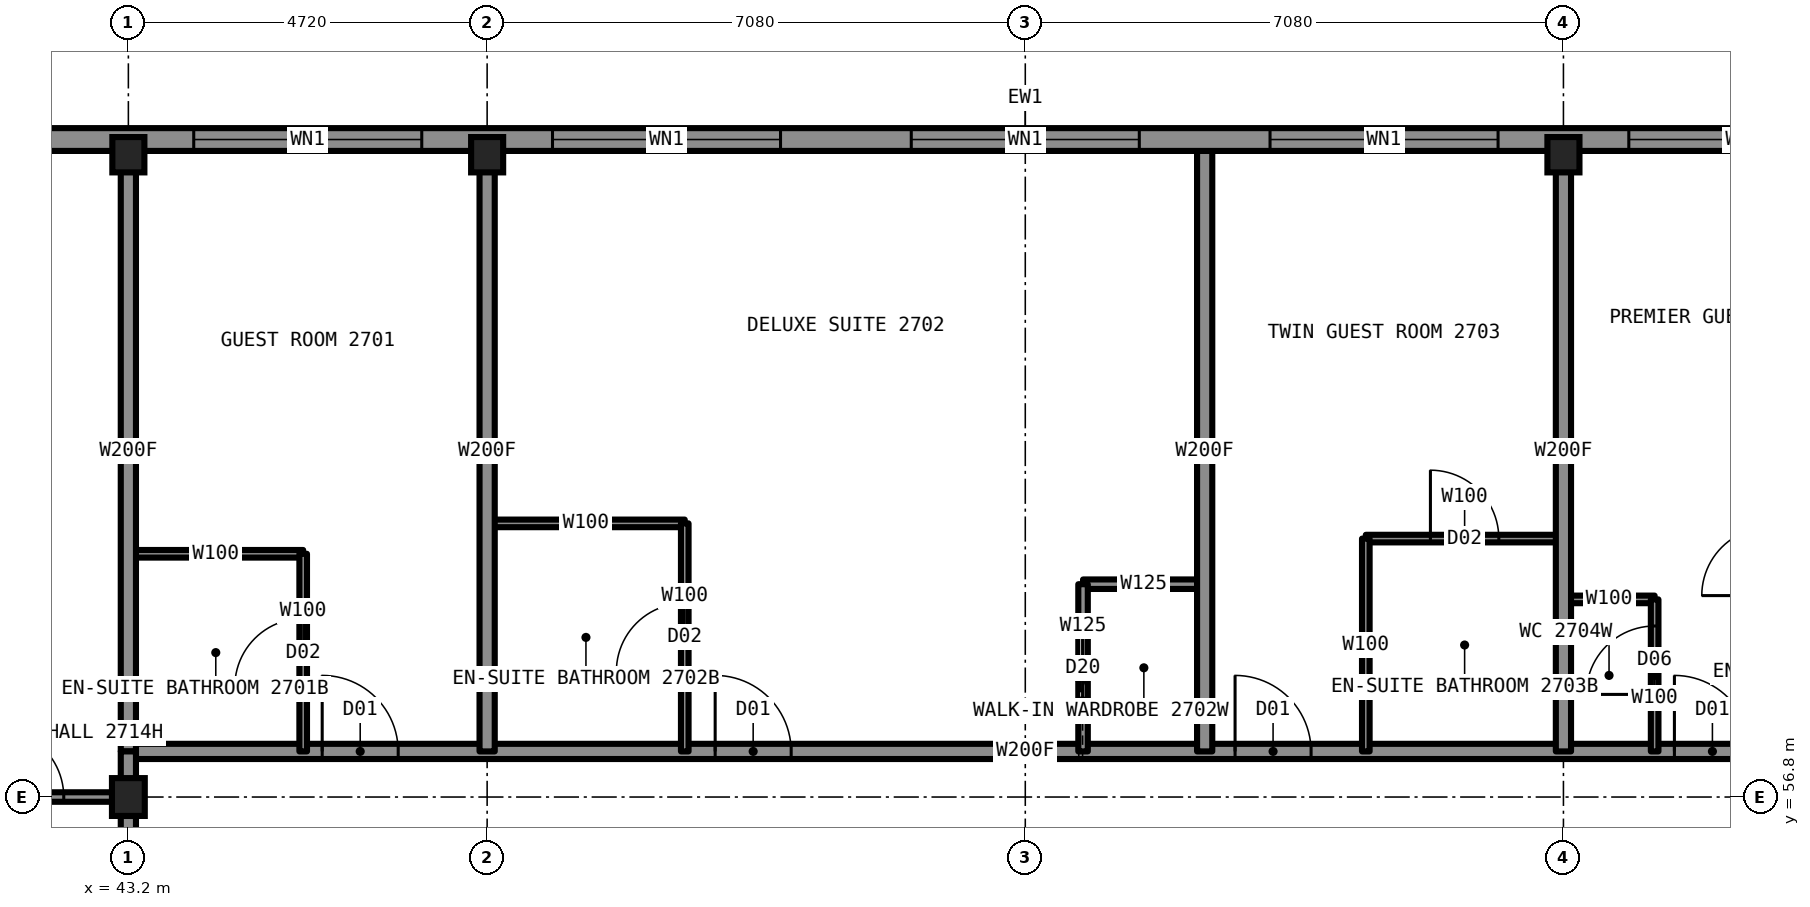
"""IFC4 building model, lengths in metres.
Left out: names, types, materials, properties, quantities, classifications, styles, units other than length and angle.
Written with IfcOpenShell. Run it as: python <this file> out.ifc"""

import sys

from ifc_helpers import new_model, si_unit, direction, frame, frame_2d, origin, origin_2d, place, context, subcontext, project, spatial, rectangle, i_section, extrude, element, fill, save


model = new_model("IFC4")
c1 = context("Model", 3, precision=1e-05, world=origin(), true_north=direction((0.0, 1.0)))
c2 = subcontext(c1, "Body", "Model", "MODEL_VIEW")
j1 = project(units=[si_unit("LENGTHUNIT", "METRE"), si_unit("PLANEANGLEUNIT", "RADIAN")], contexts=[c1])
p1 = place(None, origin())
s1 = spatial("IfcSite", under=j1, at=p1, CompositionType="ELEMENT")
p2 = place(p1, origin())
s2 = spatial("IfcBuilding", under=s1, at=p2, CompositionType="ELEMENT")
p3 = place(p2, frame((0.0, 0.0, 103.9)))
s3 = spatial("IfcBuildingStorey", under=s2, at=p3, CompositionType="ELEMENT", Elevation=103.9)
for number, where, z_axis, x_axis in (
    (1, (43.2, 65.25, 0.0), (0.0, 0.0, 1.0), (1.0, 0.0, 0.0)),
    (2, (47.92, 65.25, 0.0), (0.0, 0.0, 1.0), (1.0, 0.0, 0.0)),
    (3, (62.08, 65.25, 0.0), (0.0, 0.0, 1.0), (1.0, 0.0, 0.0)),
):
    element("IfcColumn", number, at=place(p3, frame(where, z_axis=z_axis, x_axis=x_axis)), inside=s3, PredefinedType="COLUMN", context=c2, shape_type="SweptSolid", body=[
        extrude(i_section(OverallWidth=0.422, OverallDepth=0.465, WebThickness=0.045, FlangeThickness=0.073, at=origin_2d()), origin(), (0.0, 0.0, 1.0), 3.5),
    ])
p4 = place(p3, frame((43.2, 56.8, 0.0), z_axis=(0.0, 0.0, 1.0), x_axis=(1.0, 0.0, 0.0)))
e4 = element("IfcColumn", 4, at=p4, inside=s3, PredefinedType="COLUMN", context=c2, shape_type="SweptSolid", body=[
    extrude(i_section(OverallWidth=0.432, OverallDepth=0.498, WebThickness=0.056, FlangeThickness=0.089, at=origin_2d()), origin(), (0.0, 0.0, 1.0), 3.5),
])
p5 = place(p3, frame((34.7, 56.8, 0.0), z_axis=(0.0, 0.0, 1.0), x_axis=(1.0, 0.0, 0.0)))
e5 = element("IfcWall", 5, at=p5, inside=s3, PredefinedType="PARTITIONING", context=c2, shape_type="SweptSolid", body=[
    extrude(rectangle(XDim=8.5, YDim=0.125, at=frame_2d((4.25, 0.0))), origin(), (0.0, 0.0, 1.0), 2.573),
])
p6 = place(p5, frame((6.75, 0.0, 0.0)))
e6 = element("IfcOpeningElement", 6, at=p6, cuts=e5, PredefinedType="OPENING", context=c2, shape_type="SweptSolid", body=[
    extrude(rectangle(XDim=0.9, YDim=2.2, at=frame_2d((0.45, 1.1))), frame((0.0, 0.073, 0.0), z_axis=(0.0, -1.0, 0.0), x_axis=(1.0, 0.0, 0.0)), (0.0, 0.0, 1.0), 0.145),
])
p7 = place(p3, frame((43.2, 57.4, 0.0), z_axis=(0.0, 0.0, 1.0), x_axis=(1.0, 0.0, 0.0)))
e7 = element("IfcWall", 7, at=p7, inside=s3, PredefinedType="PARTITIONING", context=c2, shape_type="SweptSolid", body=[
    extrude(rectangle(XDim=23.6, YDim=0.2, at=frame_2d((11.8, 0.0))), origin(), (0.0, 0.0, 1.0), 3.33),
])
p8 = place(p7, frame((2.55, 0.0, 0.0)))
e8 = element("IfcOpeningElement", 8, at=p8, cuts=e7, PredefinedType="OPENING", context=c2, shape_type="SweptSolid", body=[
    extrude(rectangle(XDim=1.0, YDim=2.2, at=frame_2d((0.5, 1.1))), frame((0.0, 0.11, 0.0), z_axis=(0.0, -1.0, 0.0), x_axis=(1.0, 0.0, 0.0)), (0.0, 0.0, 1.0), 0.22),
])
p9 = place(p7, frame((7.72, 0.0, 0.0)))
e9 = element("IfcOpeningElement", 9, at=p9, cuts=e7, PredefinedType="OPENING", context=c2, shape_type="SweptSolid", body=[
    extrude(rectangle(XDim=1.0, YDim=2.2, at=frame_2d((0.5, 1.1))), frame((0.0, 0.11, 0.0), z_axis=(0.0, -1.0, 0.0), x_axis=(1.0, 0.0, 0.0)), (0.0, 0.0, 1.0), 0.22),
])
p10 = place(p7, frame((14.56, 0.0, 0.0)))
e10 = element("IfcOpeningElement", 10, at=p10, cuts=e7, PredefinedType="OPENING", context=c2, shape_type="SweptSolid", body=[
    extrude(rectangle(XDim=1.0, YDim=2.2, at=frame_2d((0.5, 1.1))), frame((0.0, 0.11, 0.0), z_axis=(0.0, -1.0, 0.0), x_axis=(1.0, 0.0, 0.0)), (0.0, 0.0, 1.0), 0.22),
])
p11 = place(p7, frame((20.34, 0.0, 0.0)))
e11 = element("IfcOpeningElement", 11, at=p11, cuts=e7, PredefinedType="OPENING", context=c2, shape_type="SweptSolid", body=[
    extrude(rectangle(XDim=1.0, YDim=2.2, at=frame_2d((0.5, 1.1))), frame((0.0, 0.11, 0.0), z_axis=(0.0, -1.0, 0.0), x_axis=(1.0, 0.0, 0.0)), (0.0, 0.0, 1.0), 0.22),
])
p12 = place(p3, frame((62.08, 59.4, 0.0), z_axis=(0.0, 0.0, 1.0), x_axis=(1.0, 0.0, 0.0)))
e12 = element("IfcWall", 12, at=p12, inside=s3, PredefinedType="PARTITIONING", context=c2, shape_type="SweptSolid", body=[
    extrude(rectangle(XDim=1.2, YDim=0.1, at=frame_2d((0.6, 0.0))), origin(), (0.0, 0.0, 1.0), 3.33),
])
p13 = place(p3, frame((55.76, 59.6, 0.0), z_axis=(0.0, 0.0, 1.0), x_axis=(1.0, 0.0, 0.0)))
e13 = element("IfcWall", 13, at=p13, inside=s3, PredefinedType="PARTITIONING", context=c2, shape_type="SweptSolid", body=[
    extrude(rectangle(XDim=1.6, YDim=0.125, at=frame_2d((0.8, 0.0))), origin(), (0.0, 0.0, 1.0), 3.33),
])
p14 = place(p3, frame((43.2, 60.0, 0.0), z_axis=(0.0, 0.0, 1.0), x_axis=(1.0, 0.0, 0.0)))
e14 = element("IfcWall", 14, at=p14, inside=s3, PredefinedType="PARTITIONING", context=c2, shape_type="SweptSolid", body=[
    extrude(rectangle(XDim=2.3, YDim=0.1, at=frame_2d((1.15, 0.0))), origin(), (0.0, 0.0, 1.0), 2.731),
])
p15 = place(p3, frame((59.48, 60.2, 0.0), z_axis=(0.0, 0.0, 1.0), x_axis=(1.0, 0.0, 0.0)))
e15 = element("IfcWall", 15, at=p15, inside=s3, PredefinedType="PARTITIONING", context=c2, shape_type="SweptSolid", body=[
    extrude(rectangle(XDim=2.6, YDim=0.1, at=frame_2d((1.3, 0.0))), origin(), (0.0, 0.0, 1.0), 2.731),
])
p16 = place(p15, frame((0.85, 0.0, 0.0)))
e16 = element("IfcOpeningElement", 16, at=p16, cuts=e15, PredefinedType="OPENING", context=c2, shape_type="SweptSolid", body=[
    extrude(rectangle(XDim=0.9, YDim=2.1, at=frame_2d((0.45, 1.05))), frame((0.0, 0.06, 0.0), z_axis=(0.0, -1.0, 0.0), x_axis=(1.0, 0.0, 0.0)), (0.0, 0.0, 1.0), 0.12),
])
p17 = place(p3, frame((47.92, 60.4, 0.0), z_axis=(0.0, 0.0, 1.0), x_axis=(1.0, 0.0, 0.0)))
e17 = element("IfcWall", 17, at=p17, inside=s3, PredefinedType="PARTITIONING", context=c2, shape_type="SweptSolid", body=[
    extrude(rectangle(XDim=2.6, YDim=0.1, at=frame_2d((1.3, 0.0))), origin(), (0.0, 0.0, 1.0), 3.33),
])
p18 = place(p3, frame((43.2, 33.2, 0.0), z_axis=(0.0, 0.0, 1.0), x_axis=(0.0, 1.0, 0.0)))
e18 = element("IfcWall", 18, at=p18, inside=s3, PredefinedType="PARTITIONING", context=c2, shape_type="SweptSolid", body=[
    extrude(rectangle(XDim=23.58, YDim=0.2, at=frame_2d((11.79, 0.0))), origin(), (0.0, 0.0, 1.0), 3.33),
])
p19 = place(p18, frame((7.72, 0.0, 0.0)))
e19 = element("IfcOpeningElement", 19, at=p19, cuts=e18, PredefinedType="OPENING", context=c2, shape_type="SweptSolid", body=[
    extrude(rectangle(XDim=1.0, YDim=2.2, at=frame_2d((0.5, 1.1))), frame((0.0, 0.11, 0.0), z_axis=(0.0, -1.0, 0.0), x_axis=(1.0, 0.0, 0.0)), (0.0, 0.0, 1.0), 0.22),
])
p20 = place(p18, frame((14.56, 0.0, 0.0)))
e20 = element("IfcOpeningElement", 20, at=p20, cuts=e18, PredefinedType="OPENING", context=c2, shape_type="SweptSolid", body=[
    extrude(rectangle(XDim=1.0, YDim=2.2, at=frame_2d((0.5, 1.1))), frame((0.0, 0.11, 0.0), z_axis=(0.0, -1.0, 0.0), x_axis=(1.0, 0.0, 0.0)), (0.0, 0.0, 1.0), 0.22),
])
p21 = place(p18, frame((21.84, 0.0, 0.0)))
e21 = element("IfcOpeningElement", 21, at=p21, cuts=e18, PredefinedType="OPENING", context=c2, shape_type="SweptSolid", body=[
    extrude(rectangle(XDim=1.1, YDim=2.2, at=frame_2d((0.55, 1.1))), frame((0.0, 0.11, 0.0), z_axis=(0.0, -1.0, 0.0), x_axis=(1.0, 0.0, 0.0)), (0.0, 0.0, 1.0), 0.22),
])
p22 = place(p18, frame((0.66, 0.0, 0.0)))
e22 = element("IfcOpeningElement", 22, at=p22, cuts=e18, PredefinedType="OPENING", context=c2, shape_type="SweptSolid", body=[
    extrude(rectangle(XDim=1.1, YDim=2.2, at=frame_2d((0.55, 1.1))), frame((0.0, 0.11, 0.0), z_axis=(0.0, -1.0, 0.0), x_axis=(1.0, 0.0, 0.0)), (0.0, 0.0, 1.0), 0.22),
])
p23 = place(p3, frame((43.2, 57.4, 0.0), z_axis=(0.0, 0.0, 1.0), x_axis=(0.0, 1.0, 0.0)))
e23 = element("IfcWall", 23, at=p23, inside=s3, PredefinedType="PARTITIONING", context=c2, shape_type="SweptSolid", body=[
    extrude(rectangle(XDim=7.9, YDim=0.2, at=frame_2d((3.95, 0.0))), origin(), (0.0, 0.0, 1.0), 2.573),
])
p24 = place(p3, frame((50.52, 57.4, 0.0), z_axis=(0.0, 0.0, 1.0), x_axis=(0.0, 1.0, 0.0)))
e24 = element("IfcWall", 24, at=p24, inside=s3, PredefinedType="PARTITIONING", context=c2, shape_type="SweptSolid", body=[
    extrude(rectangle(XDim=3.0, YDim=0.1, at=frame_2d((1.5, 0.0))), origin(), (0.0, 0.0, 1.0), 3.33),
])
p25 = place(p24, frame((1.05, 0.0, 0.0)))
e25 = element("IfcOpeningElement", 25, at=p25, cuts=e24, PredefinedType="OPENING", context=c2, shape_type="SweptSolid", body=[
    extrude(rectangle(XDim=0.9, YDim=2.1, at=frame_2d((0.45, 1.05))), frame((0.0, 0.06, 0.0), z_axis=(0.0, -1.0, 0.0), x_axis=(1.0, 0.0, 0.0)), (0.0, 0.0, 1.0), 0.12),
])
p26 = place(p3, frame((47.92, 57.4, 0.0), z_axis=(0.0, 0.0, 1.0), x_axis=(0.0, 1.0, 0.0)))
e26 = element("IfcWall", 26, at=p26, inside=s3, PredefinedType="PARTITIONING", context=c2, shape_type="SweptSolid", body=[
    extrude(rectangle(XDim=7.9, YDim=0.2, at=frame_2d((3.95, 0.0))), origin(), (0.0, 0.0, 1.0), 2.573),
])
p27 = place(p3, frame((45.5, 57.4, 0.0), z_axis=(0.0, 0.0, 1.0), x_axis=(0.0, 1.0, 0.0)))
e27 = element("IfcWall", 27, at=p27, inside=s3, PredefinedType="PARTITIONING", context=c2, shape_type="SweptSolid", body=[
    extrude(rectangle(XDim=2.6, YDim=0.1, at=frame_2d((1.3, 0.0))), origin(), (0.0, 0.0, 1.0), 3.33),
])
p28 = place(p27, frame((0.85, 0.0, 0.0)))
e28 = element("IfcOpeningElement", 28, at=p28, cuts=e27, PredefinedType="OPENING", context=c2, shape_type="SweptSolid", body=[
    extrude(rectangle(XDim=0.9, YDim=2.1, at=frame_2d((0.45, 1.05))), frame((0.0, 0.06, 0.0), z_axis=(0.0, -1.0, 0.0), x_axis=(1.0, 0.0, 0.0)), (0.0, 0.0, 1.0), 0.12),
])
p29 = place(p3, frame((55.76, 57.4, 0.0), z_axis=(0.0, 0.0, 1.0), x_axis=(0.0, 1.0, 0.0)))
e29 = element("IfcWall", 29, at=p29, inside=s3, PredefinedType="PARTITIONING", context=c2, shape_type="SweptSolid", body=[
    extrude(rectangle(XDim=2.2, YDim=0.125, at=frame_2d((1.1, 0.0))), origin(), (0.0, 0.0, 1.0), 3.33),
])
p30 = place(p29, frame((0.7, 0.0, 0.0)))
e30 = element("IfcOpeningElement", 30, at=p30, cuts=e29, PredefinedType="OPENING", context=c2, shape_type="SweptSolid", body=[
    extrude(rectangle(XDim=0.8, YDim=2.1, at=frame_2d((0.4, 1.05))), frame((0.0, 0.073, 0.0), z_axis=(0.0, -1.0, 0.0), x_axis=(1.0, 0.0, 0.0)), (0.0, 0.0, 1.0), 0.145),
])
p31 = place(p3, frame((57.36, 57.4, 0.0), z_axis=(0.0, 0.0, 1.0), x_axis=(0.0, 1.0, 0.0)))
e31 = element("IfcWall", 31, at=p31, inside=s3, PredefinedType="PARTITIONING", context=c2, shape_type="SweptSolid", body=[
    extrude(rectangle(XDim=7.9, YDim=0.2, at=frame_2d((3.95, 0.0))), origin(), (0.0, 0.0, 1.0), 3.33),
])
p32 = place(p3, frame((59.48, 57.4, 0.0), z_axis=(0.0, 0.0, 1.0), x_axis=(0.0, 1.0, 0.0)))
e32 = element("IfcWall", 32, at=p32, inside=s3, PredefinedType="PARTITIONING", context=c2, shape_type="SweptSolid", body=[
    extrude(rectangle(XDim=2.8, YDim=0.1, at=frame_2d((1.4, 0.0))), origin(), (0.0, 0.0, 1.0), 3.33),
])
p33 = place(p3, frame((62.08, 57.4, 0.0), z_axis=(0.0, 0.0, 1.0), x_axis=(0.0, 1.0, 0.0)))
e33 = element("IfcWall", 33, at=p33, inside=s3, PredefinedType="PARTITIONING", context=c2, shape_type="SweptSolid", body=[
    extrude(rectangle(XDim=7.9, YDim=0.2, at=frame_2d((3.95, 0.0))), origin(), (0.0, 0.0, 1.0), 2.573),
])
p34 = place(p3, frame((63.28, 57.4, 0.0), z_axis=(0.0, 0.0, 1.0), x_axis=(0.0, 1.0, 0.0)))
e34 = element("IfcWall", 34, at=p34, inside=s3, PredefinedType="PARTITIONING", context=c2, shape_type="SweptSolid", body=[
    extrude(rectangle(XDim=2.0, YDim=0.1, at=frame_2d((1.0, 0.0))), origin(), (0.0, 0.0, 1.0), 3.33),
])
p35 = place(p34, frame((0.75, 0.0, 0.0)))
e35 = element("IfcOpeningElement", 35, at=p35, cuts=e34, PredefinedType="OPENING", context=c2, shape_type="SweptSolid", body=[
    extrude(rectangle(XDim=0.9, YDim=2.1, at=frame_2d((0.45, 1.05))), frame((0.0, 0.06, 0.0), z_axis=(0.0, -1.0, 0.0), x_axis=(1.0, 0.0, 0.0)), (0.0, 0.0, 1.0), 0.12),
])
p36 = place(p3, frame((70.1, 65.45, 0.0), z_axis=(0.0, 0.0, 1.0), x_axis=(-1.0, 0.0, 0.0)))
e36 = element("IfcWall", 36, at=p36, inside=s3, PredefinedType="SOLIDWALL", context=c2, shape_type="SweptSolid", body=[
    extrude(rectangle(XDim=30.2, YDim=0.3, at=frame_2d((15.1, 0.0))), origin(), (0.0, 0.0, 1.0), 2.83),
])
p37 = place(p36, frame((4.16, 0.0, 0.5)))
e37 = element("IfcOpeningElement", 37, at=p37, cuts=e36, PredefinedType="OPENING", context=c2, shape_type="SweptSolid", body=[
    extrude(rectangle(XDim=3.0, YDim=2.0, at=frame_2d((1.5, 1.0))), frame((0.0, 0.16, 0.0), z_axis=(0.0, -1.0, 0.0), x_axis=(1.0, 0.0, 0.0)), (0.0, 0.0, 1.0), 0.32),
])
p38 = place(p36, frame((8.88, 0.0, 0.5)))
e38 = element("IfcOpeningElement", 38, at=p38, cuts=e36, PredefinedType="OPENING", context=c2, shape_type="SweptSolid", body=[
    extrude(rectangle(XDim=3.0, YDim=2.0, at=frame_2d((1.5, 1.0))), frame((0.0, 0.16, 0.0), z_axis=(0.0, -1.0, 0.0), x_axis=(1.0, 0.0, 0.0)), (0.0, 0.0, 1.0), 0.32),
])
p39 = place(p36, frame((13.6, 0.0, 0.5)))
e39 = element("IfcOpeningElement", 39, at=p39, cuts=e36, PredefinedType="OPENING", context=c2, shape_type="SweptSolid", body=[
    extrude(rectangle(XDim=3.0, YDim=2.0, at=frame_2d((1.5, 1.0))), frame((0.0, 0.16, 0.0), z_axis=(0.0, -1.0, 0.0), x_axis=(1.0, 0.0, 0.0)), (0.0, 0.0, 1.0), 0.32),
])
p40 = place(p36, frame((18.32, 0.0, 0.5)))
e40 = element("IfcOpeningElement", 40, at=p40, cuts=e36, PredefinedType="OPENING", context=c2, shape_type="SweptSolid", body=[
    extrude(rectangle(XDim=3.0, YDim=2.0, at=frame_2d((1.5, 1.0))), frame((0.0, 0.16, 0.0), z_axis=(0.0, -1.0, 0.0), x_axis=(1.0, 0.0, 0.0)), (0.0, 0.0, 1.0), 0.32),
])
p41 = place(p36, frame((23.04, 0.0, 0.5)))
e41 = element("IfcOpeningElement", 41, at=p41, cuts=e36, PredefinedType="OPENING", context=c2, shape_type="SweptSolid", body=[
    extrude(rectangle(XDim=3.0, YDim=2.0, at=frame_2d((1.5, 1.0))), frame((0.0, 0.16, 0.0), z_axis=(0.0, -1.0, 0.0), x_axis=(1.0, 0.0, 0.0)), (0.0, 0.0, 1.0), 0.32),
])
p42 = place(p3, frame((43.2, 56.78, 0.0), z_axis=(0.0, 0.0, 1.0), x_axis=(0.0, 1.0, 0.0)))
e42 = element("IfcWall", 42, at=p42, inside=s3, PredefinedType="PARTITIONING", context=c2, shape_type="SweptSolid", body=[
    extrude(rectangle(XDim=0.62, YDim=0.2, at=frame_2d((0.31, 0.0))), origin(), (0.0, 0.0, 1.0), 2.573),
])
p43 = place(p8, origin())
e43 = element("IfcDoor", 43, at=p43, inside=s3, OperationType="SINGLE_SWING_LEFT", PredefinedType="DOOR", context=c2, shape_type="SweptSolid", body=[
    extrude(rectangle(XDim=1.0, YDim=2.2, at=frame_2d((0.5, 1.1))), frame((0.0, 0.025, 0.0), z_axis=(0.0, -1.0, 0.0), x_axis=(1.0, 0.0, 0.0)), (0.0, 0.0, 1.0), 0.05),
])
fill(e8, e43)
p44 = place(p28, origin())
e44 = element("IfcDoor", 44, at=p44, inside=s3, OperationType="SINGLE_SWING_RIGHT", PredefinedType="DOOR", context=c2, shape_type="SweptSolid", body=[
    extrude(rectangle(XDim=0.9, YDim=2.1, at=frame_2d((0.45, 1.05))), frame((0.0, 0.025, 0.0), z_axis=(0.0, -1.0, 0.0), x_axis=(1.0, 0.0, 0.0)), (0.0, 0.0, 1.0), 0.05),
])
fill(e28, e44)
p45 = place(p9, origin())
e45 = element("IfcDoor", 45, at=p45, inside=s3, OperationType="SINGLE_SWING_LEFT", PredefinedType="DOOR", context=c2, shape_type="SweptSolid", body=[
    extrude(rectangle(XDim=1.0, YDim=2.2, at=frame_2d((0.5, 1.1))), frame((0.0, 0.025, 0.0), z_axis=(0.0, -1.0, 0.0), x_axis=(1.0, 0.0, 0.0)), (0.0, 0.0, 1.0), 0.05),
])
fill(e9, e45)
p46 = place(p25, origin())
e46 = element("IfcDoor", 46, at=p46, inside=s3, OperationType="SINGLE_SWING_RIGHT", PredefinedType="DOOR", context=c2, shape_type="SweptSolid", body=[
    extrude(rectangle(XDim=0.9, YDim=2.1, at=frame_2d((0.45, 1.05))), frame((0.0, 0.025, 0.0), z_axis=(0.0, -1.0, 0.0), x_axis=(1.0, 0.0, 0.0)), (0.0, 0.0, 1.0), 0.05),
])
fill(e25, e46)
p47 = place(p30, origin())
e47 = element("IfcDoor", 47, at=p47, inside=s3, OperationType="SLIDING_TO_LEFT", PredefinedType="DOOR", context=c2, shape_type="SweptSolid", body=[
    extrude(rectangle(XDim=0.8, YDim=2.1, at=frame_2d((0.4, 1.05))), frame((0.0, 0.025, 0.0), z_axis=(0.0, -1.0, 0.0), x_axis=(1.0, 0.0, 0.0)), (0.0, 0.0, 1.0), 0.05),
])
fill(e30, e47)
p48 = place(p10, origin())
e48 = element("IfcDoor", 48, at=p48, inside=s3, OperationType="SINGLE_SWING_LEFT", PredefinedType="DOOR", context=c2, shape_type="SweptSolid", body=[
    extrude(rectangle(XDim=1.0, YDim=2.2, at=frame_2d((0.5, 1.1))), frame((0.0, 0.025, 0.0), z_axis=(0.0, -1.0, 0.0), x_axis=(1.0, 0.0, 0.0)), (0.0, 0.0, 1.0), 0.05),
])
fill(e10, e48)
p49 = place(p16, origin())
e49 = element("IfcDoor", 49, at=p49, inside=s3, OperationType="SINGLE_SWING_RIGHT", PredefinedType="DOOR", context=c2, shape_type="SweptSolid", body=[
    extrude(rectangle(XDim=0.9, YDim=2.1, at=frame_2d((0.45, 1.05))), frame((0.0, 0.025, 0.0), z_axis=(0.0, -1.0, 0.0), x_axis=(1.0, 0.0, 0.0)), (0.0, 0.0, 1.0), 0.05),
])
fill(e16, e49)
p50 = place(p11, origin())
e50 = element("IfcDoor", 50, at=p50, inside=s3, OperationType="SINGLE_SWING_LEFT", PredefinedType="DOOR", context=c2, shape_type="SweptSolid", body=[
    extrude(rectangle(XDim=1.0, YDim=2.2, at=frame_2d((0.5, 1.1))), frame((0.0, 0.025, 0.0), z_axis=(0.0, -1.0, 0.0), x_axis=(1.0, 0.0, 0.0)), (0.0, 0.0, 1.0), 0.05),
])
fill(e11, e50)
p51 = place(p35, origin())
e51 = element("IfcDoor", 51, at=p51, inside=s3, OperationType="SINGLE_SWING_LEFT", PredefinedType="DOOR", context=c2, shape_type="SweptSolid", body=[
    extrude(rectangle(XDim=0.9, YDim=2.1, at=frame_2d((0.45, 1.05))), frame((0.0, 0.025, 0.0), z_axis=(0.0, -1.0, 0.0), x_axis=(1.0, 0.0, 0.0)), (0.0, 0.0, 1.0), 0.05),
])
fill(e35, e51)
p52 = place(p6, origin())
e52 = element("IfcDoor", 52, at=p52, inside=s3, OperationType="SINGLE_SWING_LEFT", PredefinedType="DOOR", context=c2, shape_type="SweptSolid", body=[
    extrude(rectangle(XDim=0.9, YDim=2.2, at=frame_2d((0.45, 1.1))), frame((0.0, 0.025, 0.0), z_axis=(0.0, -1.0, 0.0), x_axis=(1.0, 0.0, 0.0)), (0.0, 0.0, 1.0), 0.05),
])
fill(e6, e52)
p53 = place(p37, origin())
e53 = element("IfcWindow", 53, at=p53, inside=s3, PartitioningType="SINGLE_PANEL", PredefinedType="WINDOW", context=c2, shape_type="SweptSolid", body=[
    extrude(rectangle(XDim=3.0, YDim=2.0, at=frame_2d((1.5, 1.0))), frame((0.0, 0.03, 0.0), z_axis=(0.0, -1.0, 0.0), x_axis=(1.0, 0.0, 0.0)), (0.0, 0.0, 1.0), 0.06),
])
fill(e37, e53)
p54 = place(p38, origin())
e54 = element("IfcWindow", 54, at=p54, inside=s3, PartitioningType="SINGLE_PANEL", PredefinedType="WINDOW", context=c2, shape_type="SweptSolid", body=[
    extrude(rectangle(XDim=3.0, YDim=2.0, at=frame_2d((1.5, 1.0))), frame((0.0, 0.03, 0.0), z_axis=(0.0, -1.0, 0.0), x_axis=(1.0, 0.0, 0.0)), (0.0, 0.0, 1.0), 0.06),
])
fill(e38, e54)
p55 = place(p39, origin())
e55 = element("IfcWindow", 55, at=p55, inside=s3, PartitioningType="SINGLE_PANEL", PredefinedType="WINDOW", context=c2, shape_type="SweptSolid", body=[
    extrude(rectangle(XDim=3.0, YDim=2.0, at=frame_2d((1.5, 1.0))), frame((0.0, 0.03, 0.0), z_axis=(0.0, -1.0, 0.0), x_axis=(1.0, 0.0, 0.0)), (0.0, 0.0, 1.0), 0.06),
])
fill(e39, e55)
p56 = place(p40, origin())
e56 = element("IfcWindow", 56, at=p56, inside=s3, PartitioningType="SINGLE_PANEL", PredefinedType="WINDOW", context=c2, shape_type="SweptSolid", body=[
    extrude(rectangle(XDim=3.0, YDim=2.0, at=frame_2d((1.5, 1.0))), frame((0.0, 0.03, 0.0), z_axis=(0.0, -1.0, 0.0), x_axis=(1.0, 0.0, 0.0)), (0.0, 0.0, 1.0), 0.06),
])
fill(e40, e56)
p57 = place(p41, origin())
e57 = element("IfcWindow", 57, at=p57, inside=s3, PartitioningType="SINGLE_PANEL", PredefinedType="WINDOW", context=c2, shape_type="SweptSolid", body=[
    extrude(rectangle(XDim=3.0, YDim=2.0, at=frame_2d((1.5, 1.0))), frame((0.0, 0.03, 0.0), z_axis=(0.0, -1.0, 0.0), x_axis=(1.0, 0.0, 0.0)), (0.0, 0.0, 1.0), 0.06),
])
fill(e41, e57)
save(model, sys.argv[1])
